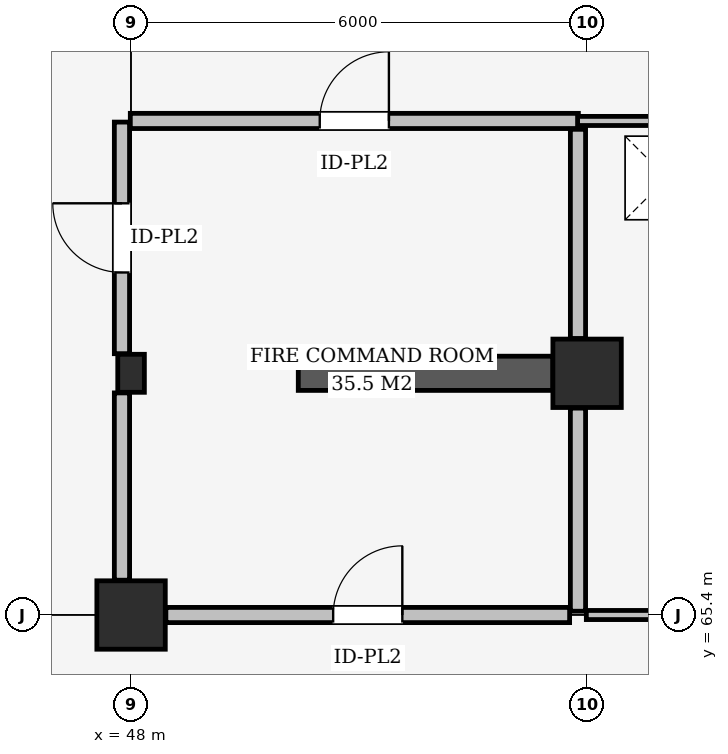
"""IFC4 building model, lengths in metres.
Left out: names, types, materials, properties, quantities, classifications, styles, units other than length and angle.
Written with IfcOpenShell. Run it as: python <this file> out.ifc"""

import sys

from ifc_helpers import new_model, si_unit, direction, frame, frame_2d, origin, origin_2d, place, context, subcontext, project, spatial, rectangle, extrude, element, fill, save


model = new_model("IFC4")
c1 = context("Model", 3, precision=1e-05, world=origin(), true_north=direction((0.0, 1.0)))
c2 = subcontext(c1, "Body", "Model", "MODEL_VIEW")
j1 = project(units=[si_unit("LENGTHUNIT", "METRE"), si_unit("PLANEANGLEUNIT", "RADIAN")], contexts=[c1])
p1 = place(None, origin())
s1 = spatial("IfcSite", under=j1, at=p1, CompositionType="ELEMENT")
p2 = place(p1, origin())
s2 = spatial("IfcBuilding", under=s1, at=p2, CompositionType="ELEMENT")
p3 = place(p2, origin())
s3 = spatial("IfcBuildingStorey", under=s2, at=p3, CompositionType="ELEMENT", Elevation=0.0)
for number, where, z_axis, x_axis in (
    (1, (48.0, 65.4, 0.0), (0.0, 0.0, 1.0), (1.0, 0.0, 0.0)),
    (2, (54.0, 68.58, 0.0), (0.0, 0.0, 1.0), (1.0, 0.0, 0.0)),
):
    element("IfcColumn", number, at=place(p3, frame(where, z_axis=z_axis, x_axis=x_axis)), inside=s3, PredefinedType="COLUMN", context=c2, shape_type="SweptSolid", body=[
        extrude(rectangle(XDim=0.9, YDim=0.9, at=origin_2d()), origin(), (0.0, 0.0, 1.0), 4.8),
    ])
p4 = place(p3, frame((48.0, 68.58, 0.0), z_axis=(0.0, 0.0, 1.0), x_axis=(1.0, 0.0, 0.0)))
e3 = element("IfcColumn", 3, at=p4, inside=s3, PredefinedType="PILASTER", context=c2, shape_type="SweptSolid", body=[
    extrude(rectangle(XDim=0.35, YDim=0.5, at=origin_2d()), origin(), (0.0, 0.0, 1.0), 4.8),
])
p5 = place(p3, frame((50.2, 68.58, 0.0), z_axis=(0.0, 0.0, 1.0), x_axis=(1.0, 0.0, 0.0)))
e4 = element("IfcWall", 4, at=p5, inside=s3, PredefinedType="SHEAR", context=c2, shape_type="SweptSolid", body=[
    extrude(rectangle(XDim=3.35, YDim=0.45, at=frame_2d((1.675, 0.0))), origin(), (0.0, 0.0, 1.0), 3.805),
])
p6 = place(p3, frame((47.88, 65.858, 0.0), z_axis=(0.0, 0.0, 1.0), x_axis=(0.0, 1.0, 0.0)))
e5 = element("IfcWall", 5, at=p6, inside=s3, PredefinedType="PARTITIONING", context=c2, shape_type="SweptSolid", body=[
    extrude(rectangle(XDim=2.464, YDim=0.2, at=frame_2d((1.232, 0.0))), origin(), (0.0, 0.0, 1.0), 3.868),
])
p7 = place(p3, frame((47.88, 68.838, 0.0), z_axis=(0.0, 0.0, 1.0), x_axis=(0.0, 1.0, 0.0)))
e6 = element("IfcWall", 6, at=p7, inside=s3, PredefinedType="PARTITIONING", context=c2, shape_type="SweptSolid", body=[
    extrude(rectangle(XDim=3.047, YDim=0.2, at=frame_2d((1.523, 0.0))), origin(), (0.0, 0.0, 1.0), 3.869),
])
p8 = place(p7, frame((1.069, 0.0, 0.0)))
e7 = element("IfcOpeningElement", 7, at=p8, cuts=e6, PredefinedType="OPENING", context=c2, shape_type="SweptSolid", body=[
    extrude(rectangle(XDim=0.91, YDim=2.1, at=frame_2d((0.455, 1.05))), frame((0.0, 0.11, 0.0), z_axis=(0.0, -1.0, 0.0), x_axis=(1.0, 0.0, 0.0)), (0.0, 0.0, 1.0), 0.22),
])
p9 = place(p3, frame((47.99, 71.9, 0.0), z_axis=(0.0, 0.0, 1.0), x_axis=(1.0, 0.0, 0.0)))
e8 = element("IfcWall", 8, at=p9, inside=s3, PredefinedType="PARTITIONING", context=c2, shape_type="SweptSolid", body=[
    extrude(rectangle(XDim=5.895, YDim=0.2, at=frame_2d((2.948, 0.0))), origin(), (0.0, 0.0, 1.0), 4.48),
])
p10 = place(p9, frame((2.492, 0.0, 0.0)))
e9 = element("IfcOpeningElement", 9, at=p10, cuts=e8, PredefinedType="OPENING", context=c2, shape_type="SweptSolid", body=[
    extrude(rectangle(XDim=0.91, YDim=2.1, at=frame_2d((0.455, 1.05))), frame((0.0, 0.11, 0.0), z_axis=(0.0, -1.0, 0.0), x_axis=(1.0, 0.0, 0.0)), (0.0, 0.0, 1.0), 0.22),
])
p11 = place(p3, frame((53.875, 71.9, 0.0), z_axis=(0.0, 0.0, 1.0), x_axis=(1.0, 0.0, 0.0)))
e10 = element("IfcWall", 10, at=p11, inside=s3, PredefinedType="PARTITIONING", context=c2, shape_type="SweptSolid", body=[
    extrude(rectangle(XDim=5.945, YDim=0.12, at=frame_2d((2.973, 0.0))), origin(), (0.0, 0.0, 1.0), 4.48),
])
p12 = place(p11, frame((2.492, 0.0, 0.0)))
e11 = element("IfcOpeningElement", 11, at=p12, cuts=e10, PredefinedType="OPENING", context=c2, shape_type="SweptSolid", body=[
    extrude(rectangle(XDim=0.96, YDim=2.16, at=frame_2d((0.48, 1.08))), frame((0.0, 0.07, 0.0), z_axis=(0.0, -1.0, 0.0), x_axis=(1.0, 0.0, 0.0)), (0.0, 0.0, 1.0), 0.14),
])
p13 = place(p3, frame((53.88, 65.45, 0.0), z_axis=(0.0, 0.0, 1.0), x_axis=(0.0, 1.0, 0.0)))
e12 = element("IfcWall", 12, at=p13, inside=s3, PredefinedType="PARTITIONING", context=c2, shape_type="SweptSolid", body=[
    extrude(rectangle(XDim=2.672, YDim=0.2, at=frame_2d((1.336, 0.0))), origin(), (0.0, 0.0, 1.0), 4.48),
])
p14 = place(p3, frame((53.88, 69.038, 0.0), z_axis=(0.0, 0.0, 1.0), x_axis=(0.0, 1.0, 0.0)))
e13 = element("IfcWall", 13, at=p14, inside=s3, PredefinedType="PARTITIONING", context=c2, shape_type="SweptSolid", body=[
    extrude(rectangle(XDim=2.752, YDim=0.2, at=frame_2d((1.376, 0.0))), origin(), (0.0, 0.0, 1.0), 4.48),
])
p15 = place(p3, frame((48.458, 65.4, 0.0), z_axis=(0.0, 0.0, 1.0), x_axis=(1.0, 0.0, 0.0)))
e14 = element("IfcWall", 14, at=p15, inside=s3, PredefinedType="PARTITIONING", context=c2, shape_type="SweptSolid", body=[
    extrude(rectangle(XDim=5.312, YDim=0.2, at=frame_2d((2.656, 0.0))), origin(), (0.0, 0.0, 1.0), 3.787),
])
p16 = place(p15, frame((2.201, 0.0, 0.0)))
e15 = element("IfcOpeningElement", 15, at=p16, cuts=e14, PredefinedType="OPENING", context=c2, shape_type="SweptSolid", body=[
    extrude(rectangle(XDim=0.91, YDim=2.1, at=frame_2d((0.455, 1.05))), frame((0.0, 0.11, 0.0), z_axis=(0.0, -1.0, 0.0), x_axis=(1.0, 0.0, 0.0)), (0.0, 0.0, 1.0), 0.22),
])
p17 = place(p3, frame((53.99, 65.4, 0.0), z_axis=(0.0, 0.0, 1.0), x_axis=(1.0, 0.0, 0.0)))
e16 = element("IfcWall", 16, at=p17, inside=s3, PredefinedType="PARTITIONING", context=c2, shape_type="SweptSolid", body=[
    extrude(rectangle(XDim=5.527, YDim=0.12, at=frame_2d((2.764, 0.0))), origin(), (0.0, 0.0, 1.0), 3.787),
])
p18 = place(p17, frame((2.283, 0.0, 0.0)))
e17 = element("IfcOpeningElement", 17, at=p18, cuts=e16, PredefinedType="OPENING", context=c2, shape_type="SweptSolid", body=[
    extrude(rectangle(XDim=0.96, YDim=2.16, at=frame_2d((0.48, 1.08))), frame((0.0, 0.07, 0.0), z_axis=(0.0, -1.0, 0.0), x_axis=(1.0, 0.0, 0.0)), (0.0, 0.0, 1.0), 0.14),
])
p19 = place(p8, origin())
e18 = element("IfcDoor", 18, at=p19, inside=s3, OperationType="SINGLE_SWING_RIGHT", PredefinedType="DOOR", context=c2, shape_type="SweptSolid", body=[
    extrude(rectangle(XDim=0.91, YDim=2.1, at=frame_2d((0.455, 1.05))), frame((0.0, 0.025, 0.0), z_axis=(0.0, -1.0, 0.0), x_axis=(1.0, 0.0, 0.0)), (0.0, 0.0, 1.0), 0.05),
])
fill(e7, e18)
p20 = place(p10, origin())
e19 = element("IfcDoor", 19, at=p20, inside=s3, OperationType="SINGLE_SWING_RIGHT", PredefinedType="DOOR", context=c2, shape_type="SweptSolid", body=[
    extrude(rectangle(XDim=0.91, YDim=2.1, at=frame_2d((0.455, 1.05))), frame((0.0, 0.025, 0.0), z_axis=(0.0, -1.0, 0.0), x_axis=(1.0, 0.0, 0.0)), (0.0, 0.0, 1.0), 0.05),
])
fill(e9, e19)
p21 = place(p16, origin())
e20 = element("IfcDoor", 20, at=p21, inside=s3, OperationType="SINGLE_SWING_RIGHT", PredefinedType="DOOR", context=c2, shape_type="SweptSolid", body=[
    extrude(rectangle(XDim=0.91, YDim=2.1, at=frame_2d((0.455, 1.05))), frame((0.0, 0.025, 0.0), z_axis=(0.0, -1.0, 0.0), x_axis=(1.0, 0.0, 0.0)), (0.0, 0.0, 1.0), 0.05),
])
fill(e15, e20)
save(model, sys.argv[1])
